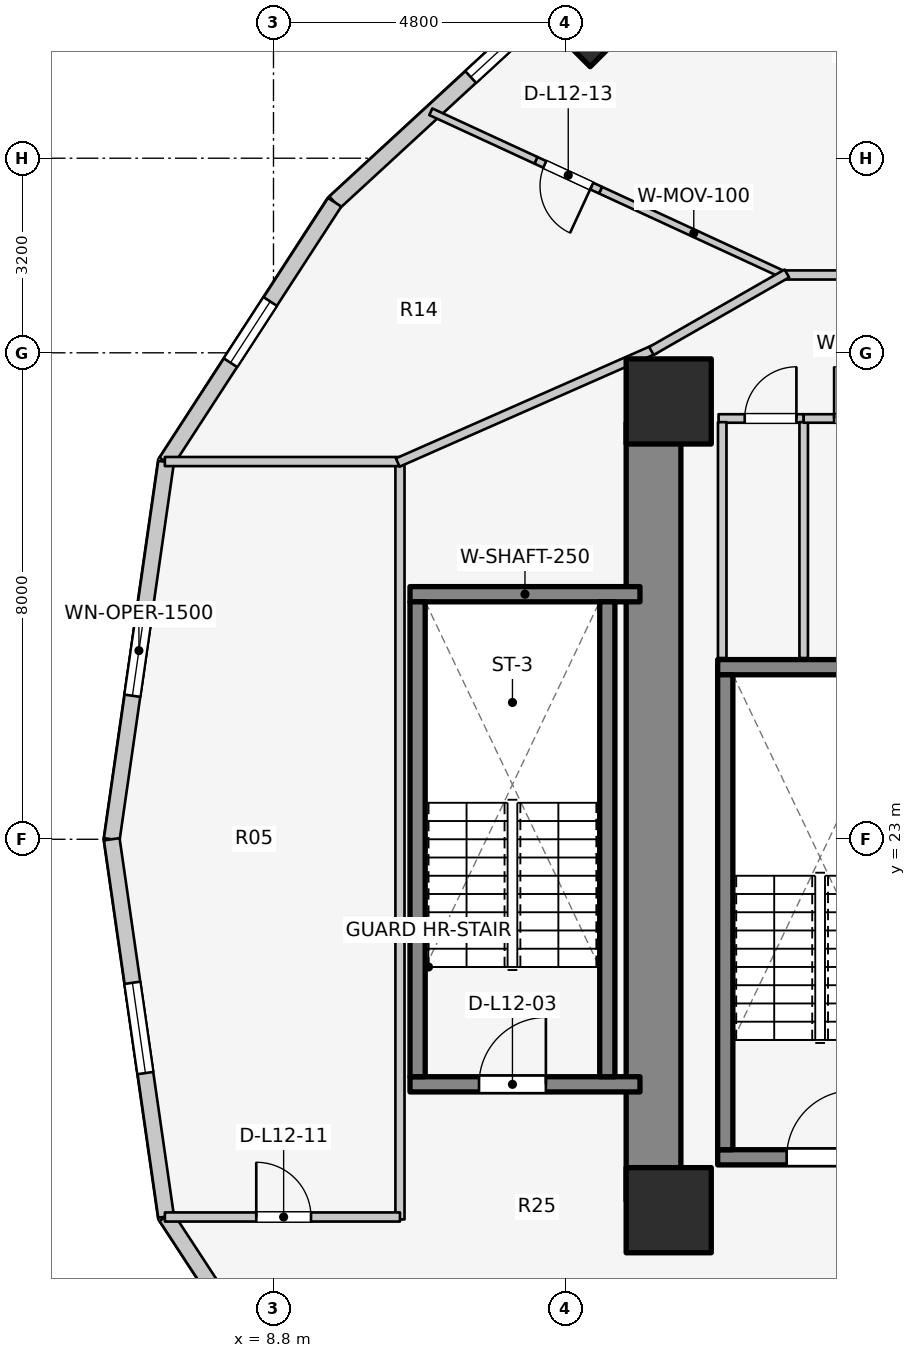
"""IFC4 building model, lengths in metres.
Left out: names, types, materials, properties, quantities, classifications, styles, units other than length and angle.
Written with IfcOpenShell. Run it as: python <this file> out.ifc"""

import sys

from ifc_helpers import new_model, si_unit, direction, frame, frame_2d, origin, origin_2d, place, context, subcontext, project, spatial, rectangle, extrude, element, fill, save


model = new_model("IFC4")
c1 = context("Model", 3, precision=1e-05, world=origin(), true_north=direction((0.0, 1.0)))
c2 = subcontext(c1, "Body", "Model", "MODEL_VIEW")
j1 = project(units=[si_unit("LENGTHUNIT", "METRE"), si_unit("PLANEANGLEUNIT", "RADIAN")], contexts=[c1])
p1 = place(None, origin())
s1 = spatial("IfcSite", under=j1, at=p1, CompositionType="ELEMENT")
p2 = place(p1, origin())
s2 = spatial("IfcBuilding", under=s1, at=p2, CompositionType="ELEMENT")
p3 = place(p2, frame((0.0, 0.0, 43.1)))
s3 = spatial("IfcBuildingStorey", under=s2, at=p3, CompositionType="ELEMENT", Elevation=43.1)
p4 = place(p3, frame((15.05, 17.05, 0.0), z_axis=(0.0, 0.0, 1.0), x_axis=(0.0, 1.0, 0.0)))
e1 = element("IfcWall", 1, at=p4, inside=s3, PredefinedType="SHEAR", context=c2, shape_type="SweptSolid", body=[
    extrude(rectangle(XDim=12.8, YDim=0.9, at=frame_2d((6.4, 0.0))), origin(), (0.0, 0.0, 1.0), 3.1),
])
p5 = place(p3, frame((16.105, 17.77, 0.0), z_axis=(0.0, 0.0, 1.0), x_axis=(1.0, 0.0, 0.0)))
e2 = element("IfcWall", 2, at=p5, inside=s3, PredefinedType="SOLIDWALL", context=c2, shape_type="SweptSolid", body=[
    extrude(rectangle(XDim=3.37, YDim=0.25, at=frame_2d((1.685, 0.0))), origin(), (0.0, 0.0, 1.0), 3.1),
])
p6 = place(p5, frame((1.135, 0.0, 0.0)))
e3 = element("IfcOpeningElement", 3, at=p6, cuts=e2, PredefinedType="OPENING", context=c2, shape_type="SweptSolid", body=[
    extrude(rectangle(XDim=1.1, YDim=2.1, at=frame_2d((0.55, 1.05))), frame((0.0, 0.135, 0.0), z_axis=(0.0, -1.0, 0.0), x_axis=(1.0, 0.0, 0.0)), (0.0, 0.0, 1.0), 0.27),
])
p7 = place(p3, frame((16.105, 25.83, 0.0), z_axis=(0.0, 0.0, 1.0), x_axis=(1.0, 0.0, 0.0)))
e4 = element("IfcWall", 4, at=p7, inside=s3, PredefinedType="SOLIDWALL", context=c2, shape_type="SweptSolid", body=[
    extrude(rectangle(XDim=3.37, YDim=0.25, at=frame_2d((1.685, 0.0))), origin(), (0.0, 0.0, 1.0), 3.1),
])
p8 = place(p3, frame((16.23, 17.895, 0.0), z_axis=(0.0, 0.0, 1.0), x_axis=(0.0, 1.0, 0.0)))
e5 = element("IfcWall", 5, at=p8, inside=s3, PredefinedType="SOLIDWALL", context=c2, shape_type="SweptSolid", body=[
    extrude(rectangle(XDim=7.81, YDim=0.25, at=frame_2d((3.905, 0.0))), origin(), (0.0, 0.0, 1.0), 3.1),
])
p9 = place(p3, frame((11.045, 18.97, 0.0), z_axis=(0.0, 0.0, 1.0), x_axis=(1.0, 0.0, 0.0)))
e6 = element("IfcWall", 6, at=p9, inside=s3, PredefinedType="SOLIDWALL", context=c2, shape_type="SweptSolid", body=[
    extrude(rectangle(XDim=3.782, YDim=0.25, at=frame_2d((1.891, 0.0))), origin(), (0.0, 0.0, 1.0), 3.1),
])
p10 = place(p9, frame((1.135, 0.0, 0.0)))
e7 = element("IfcOpeningElement", 7, at=p10, cuts=e6, PredefinedType="OPENING", context=c2, shape_type="SweptSolid", body=[
    extrude(rectangle(XDim=1.1, YDim=2.1, at=frame_2d((0.55, 1.05))), frame((0.0, 0.135, 0.0), z_axis=(0.0, -1.0, 0.0), x_axis=(1.0, 0.0, 0.0)), (0.0, 0.0, 1.0), 0.27),
])
p11 = place(p3, frame((11.045, 27.03, 0.0), z_axis=(0.0, 0.0, 1.0), x_axis=(1.0, 0.0, 0.0)))
e8 = element("IfcWall", 8, at=p11, inside=s3, PredefinedType="SOLIDWALL", context=c2, shape_type="SweptSolid", body=[
    extrude(rectangle(XDim=3.782, YDim=0.25, at=frame_2d((1.891, 0.0))), origin(), (0.0, 0.0, 1.0), 3.1),
])
for number, where, z_axis, x_axis in (
    (9, (11.17, 19.095, 0.0), (0.0, 0.0, 1.0), (0.0, 1.0, 0.0)),
    (10, (14.29, 19.095, 0.0), (0.0, 0.0, 1.0), (0.0, 1.0, 0.0)),
):
    element("IfcWall", number, at=place(p3, frame(where, z_axis=z_axis, x_axis=x_axis)), inside=s3, PredefinedType="SOLIDWALL", context=c2, shape_type="SweptSolid", body=[
        extrude(rectangle(XDim=7.81, YDim=0.25, at=frame_2d((3.905, 0.0))), origin(), (0.0, 0.0, 1.0), 3.1),
    ])
for number, where, z_axis, x_axis in (
    (11, (15.3, 16.9, 0.0), (0.0, 0.0, 1.0), (1.0, 0.0, 0.0)),
    (12, (15.3, 30.2, 0.0), (0.0, 0.0, 1.0), (1.0, 0.0, 0.0)),
):
    element("IfcColumn", number, at=place(p3, frame(where, z_axis=z_axis, x_axis=x_axis)), inside=s3, PredefinedType="COLUMN", context=c2, shape_type="SweptSolid", body=[
        extrude(rectangle(XDim=1.4, YDim=1.4, at=origin_2d()), origin(), (0.0, 0.0, 1.0), 3.1),
    ])
p12 = place(p3, frame((14.008, 36.554, 0.0), z_axis=(0.0, 0.0, 1.0), x_axis=(-0.707106781187, 0.707106781187, 0.0)))
e13 = element("IfcColumn", 13, at=p12, inside=s3, PredefinedType="COLUMN", context=c2, shape_type="SweptSolid", body=[
    extrude(rectangle(XDim=1.2, YDim=1.2, at=origin_2d()), origin(), (0.0, 0.0, 1.0), 3.1),
])
p13 = place(p3, frame((13.595, 36.965, 0.0), z_axis=(0.0, 0.0, 1.0), x_axis=(-0.735655109293, -0.67735630223, 0.0)))
e14 = element("IfcWall", 14, at=p13, inside=s3, PredefinedType="STANDARD", context=c2, shape_type="SweptSolid", body=[
    extrude(rectangle(XDim=5.151, YDim=0.26, at=frame_2d((2.575, 0.0))), origin(), (0.0, 0.0, 1.0), 1.22),
])
p14 = place(p13, frame((0.91, 0.0, 0.15)))
e15 = element("IfcOpeningElement", 15, at=p14, cuts=e14, PredefinedType="OPENING", context=c2, shape_type="SweptSolid", body=[
    extrude(rectangle(XDim=1.2, YDim=0.9, at=frame_2d((0.6, 0.45))), frame((0.0, 0.14, 0.0), z_axis=(0.0, -1.0, 0.0), x_axis=(1.0, 0.0, 0.0)), (0.0, 0.0, 1.0), 0.28),
])
p15 = place(p3, frame((9.806, 33.476, 0.0), z_axis=(0.0, 0.0, 1.0), x_axis=(-0.544578722263, -0.838709732421, 0.0)))
e16 = element("IfcWall", 16, at=p15, inside=s3, PredefinedType="STANDARD", context=c2, shape_type="SweptSolid", body=[
    extrude(rectangle(XDim=5.092, YDim=0.26, at=frame_2d((2.546, 0.0))), origin(), (0.0, 0.0, 1.0), 1.22),
])
p16 = place(p15, frame((1.946, 0.0, 0.15)))
e17 = element("IfcOpeningElement", 17, at=p16, cuts=e16, PredefinedType="OPENING", context=c2, shape_type="SweptSolid", body=[
    extrude(rectangle(XDim=1.2, YDim=0.9, at=frame_2d((0.6, 0.45))), frame((0.0, 0.14, 0.0), z_axis=(0.0, -1.0, 0.0), x_axis=(1.0, 0.0, 0.0)), (0.0, 0.0, 1.0), 0.28),
])
p17 = place(p3, frame((7.033, 29.205, 0.0), z_axis=(0.0, 0.0, 1.0), x_axis=(-0.142528001686, -0.989790770181, 0.0)))
e18 = element("IfcWall", 18, at=p17, inside=s3, PredefinedType="STANDARD", context=c2, shape_type="SweptSolid", body=[
    extrude(rectangle(XDim=6.269, YDim=0.26, at=frame_2d((3.135, 0.0))), origin(), (0.0, 0.0, 1.0), 2.57),
])
p18 = place(p17, frame((2.385, 0.0, 0.75)))
e19 = element("IfcOpeningElement", 19, at=p18, cuts=e18, PredefinedType="OPENING", context=c2, shape_type="SweptSolid", body=[
    extrude(rectangle(XDim=1.5, YDim=1.6, at=frame_2d((0.75, 0.8))), frame((0.0, 0.14, 0.0), z_axis=(0.0, -1.0, 0.0), x_axis=(1.0, 0.0, 0.0)), (0.0, 0.0, 1.0), 0.28),
])
p19 = place(p3, frame((6.14, 23.0, 0.0), z_axis=(0.0, 0.0, 1.0), x_axis=(0.142528001686, -0.989790770181, 0.0)))
e20 = element("IfcWall", 20, at=p19, inside=s3, PredefinedType="STANDARD", context=c2, shape_type="SweptSolid", body=[
    extrude(rectangle(XDim=6.269, YDim=0.26, at=frame_2d((3.135, 0.0))), origin(), (0.0, 0.0, 1.0), 2.57),
])
p20 = place(p19, frame((2.385, 0.0, 0.75)))
e21 = element("IfcOpeningElement", 21, at=p20, cuts=e20, PredefinedType="OPENING", context=c2, shape_type="SweptSolid", body=[
    extrude(rectangle(XDim=1.5, YDim=1.6, at=frame_2d((0.75, 0.8))), frame((0.0, 0.14, 0.0), z_axis=(0.0, -1.0, 0.0), x_axis=(1.0, 0.0, 0.0)), (0.0, 0.0, 1.0), 0.28),
])
p21 = place(p3, frame((7.033, 16.795, 0.0), z_axis=(0.0, 0.0, 1.0), x_axis=(0.547702757047, -0.836672988642, 0.0)))
e22 = element("IfcWall", 22, at=p21, inside=s3, PredefinedType="STANDARD", context=c2, shape_type="SweptSolid", body=[
    extrude(rectangle(XDim=5.062, YDim=0.26, at=frame_2d((2.531, 0.0))), origin(), (0.0, 0.0, 1.0), 1.22),
])
p22 = place(p21, frame((1.931, 0.0, 0.15)))
e23 = element("IfcOpeningElement", 23, at=p22, cuts=e22, PredefinedType="OPENING", context=c2, shape_type="SweptSolid", body=[
    extrude(rectangle(XDim=1.2, YDim=0.9, at=frame_2d((0.6, 0.45))), frame((0.0, 0.14, 0.0), z_axis=(0.0, -1.0, 0.0), x_axis=(1.0, 0.0, 0.0)), (0.0, 0.0, 1.0), 0.28),
])
p23 = place(p3, frame((16.12, 29.92, 0.0), z_axis=(0.0, 0.0, 1.0), x_axis=(1.0, 0.0, 0.0)))
e24 = element("IfcWall", 24, at=p23, inside=s3, PredefinedType="PLUMBINGWALL", context=c2, shape_type="SweptSolid", body=[
    extrude(rectangle(XDim=1.4, YDim=0.14, at=frame_2d((0.7, 0.0))), origin(), (0.0, 0.0, 1.0), 2.575),
])
p24 = place(p23, frame((0.43, 0.0, 0.0)))
e25 = element("IfcOpeningElement", 25, at=p24, cuts=e24, PredefinedType="OPENING", context=c2, shape_type="SweptSolid", body=[
    extrude(rectangle(XDim=0.85, YDim=2.05, at=frame_2d((0.425, 1.025))), frame((0.0, 0.08, 0.0), z_axis=(0.0, -1.0, 0.0), x_axis=(1.0, 0.0, 0.0)), (0.0, 0.0, 1.0), 0.16),
])
for number, where, z_axis, x_axis in (
    (26, (16.18, 25.98, 0.0), (0.0, 0.0, 1.0), (0.0, 1.0, 0.0)),
    (27, (17.52, 25.98, 0.0), (0.0, 0.0, 1.0), (0.0, 1.0, 0.0)),
):
    element("IfcWall", number, at=place(p3, frame(where, z_axis=z_axis, x_axis=x_axis)), inside=s3, PredefinedType="PLUMBINGWALL", context=c2, shape_type="SweptSolid", body=[
        extrude(rectangle(XDim=3.88, YDim=0.14, at=frame_2d((1.94, 0.0))), origin(), (0.0, 0.0, 1.0), 2.575),
    ])
p25 = place(p3, frame((17.52, 29.92, 0.0), z_axis=(0.0, 0.0, 1.0), x_axis=(1.0, 0.0, 0.0)))
e28 = element("IfcWall", 28, at=p25, inside=s3, PredefinedType="PLUMBINGWALL", context=c2, shape_type="SweptSolid", body=[
    extrude(rectangle(XDim=1.9, YDim=0.14, at=frame_2d((0.95, 0.0))), origin(), (0.0, 0.0, 1.0), 2.575),
])
p26 = place(p25, frame((0.5, 0.0, 0.0)))
e29 = element("IfcOpeningElement", 29, at=p26, cuts=e28, PredefinedType="OPENING", context=c2, shape_type="SweptSolid", body=[
    extrude(rectangle(XDim=0.85, YDim=2.05, at=frame_2d((0.425, 1.025))), frame((0.0, 0.08, 0.0), z_axis=(0.0, -1.0, 0.0), x_axis=(1.0, 0.0, 0.0)), (0.0, 0.0, 1.0), 0.16),
])
p27 = place(p3, frame((10.88, 16.748, 0.0), z_axis=(0.0, 0.0, 1.0), x_axis=(0.0, 1.0, 0.0)))
e30 = element("IfcWall", 30, at=p27, inside=s3, PredefinedType="PARTITIONING", context=c2, shape_type="SweptSolid", body=[
    extrude(rectangle(XDim=12.503, YDim=0.15, at=frame_2d((6.252, 0.0))), origin(), (0.0, 0.0, 1.0), 2.12),
])
p28 = place(p3, frame((7.014, 16.788, 0.0), z_axis=(0.0, 0.0, 1.0), x_axis=(1.0, 0.0, 0.0)))
e31 = element("IfcWall", 31, at=p28, inside=s3, PredefinedType="PARTITIONING", context=c2, shape_type="SweptSolid", body=[
    extrude(rectangle(XDim=3.866, YDim=0.15, at=frame_2d((1.933, 0.0))), origin(), (0.0, 0.0, 1.0), 2.575),
])
p29 = place(p28, frame((1.503, 0.0, 0.0)))
e32 = element("IfcOpeningElement", 32, at=p29, cuts=e31, PredefinedType="OPENING", context=c2, shape_type="SweptSolid", body=[
    extrude(rectangle(XDim=0.9, YDim=2.1, at=frame_2d((0.45, 1.05))), frame((0.0, 0.085, 0.0), z_axis=(0.0, -1.0, 0.0), x_axis=(1.0, 0.0, 0.0)), (0.0, 0.0, 1.0), 0.17),
])
p30 = place(p3, frame((7.014, 29.212, 0.0), z_axis=(0.0, 0.0, 1.0), x_axis=(1.0, 0.0, 0.0)))
e33 = element("IfcWall", 33, at=p30, inside=s3, PredefinedType="PARTITIONING", context=c2, shape_type="SweptSolid", body=[
    extrude(rectangle(XDim=3.866, YDim=0.15, at=frame_2d((1.933, 0.0))), origin(), (0.0, 0.0, 1.0), 2.575),
])
p31 = place(p3, frame((10.844, 29.196, 0.0), z_axis=(0.0, 0.0, 1.0), x_axis=(0.91502756289, 0.403391322604, 0.0)))
e34 = element("IfcWall", 34, at=p31, inside=s3, PredefinedType="PARTITIONING", context=c2, shape_type="SweptSolid", body=[
    extrude(rectangle(XDim=4.637, YDim=0.15, at=frame_2d((2.319, 0.0))), origin(), (0.0, 0.0, 1.0), 1.22),
])
p32 = place(p3, frame((17.245, 32.259, 0.0), z_axis=(0.0, 0.0, 1.0), x_axis=(-0.907887445426, 0.419214010307, 0.0)))
e35 = element("IfcWall", 35, at=p32, inside=s3, PredefinedType="MOVABLE", context=c2, shape_type="SweptSolid", body=[
    extrude(rectangle(XDim=3.378, YDim=0.12, at=frame_2d((1.689, 0.0))), origin(), (0.0, 0.0, 1.0), 1.22),
])
p33 = place(p3, frame((14.179, 33.675, 0.0), z_axis=(0.0, 0.0, 1.0), x_axis=(-0.907812768844, 0.419375698776, 0.0)))
e36 = element("IfcWall", 36, at=p33, inside=s3, PredefinedType="MOVABLE", context=c2, shape_type="SweptSolid", body=[
    extrude(rectangle(XDim=1.17, YDim=0.12, at=frame_2d((0.585, 0.0))), origin(), (0.0, 0.0, 1.0), 2.11),
])
p34 = place(p33, frame((0.16, 0.0, 0.0)))
e37 = element("IfcOpeningElement", 37, at=p34, cuts=e36, PredefinedType="OPENING", context=c2, shape_type="SweptSolid", body=[
    extrude(rectangle(XDim=0.85, YDim=2.05, at=frame_2d((0.425, 1.025))), frame((0.0, 0.07, 0.0), z_axis=(0.0, -1.0, 0.0), x_axis=(1.0, 0.0, 0.0)), (0.0, 0.0, 1.0), 0.14),
])
p35 = place(p3, frame((13.116, 34.166, 0.0), z_axis=(0.0, 0.0, 1.0), x_axis=(-0.907914359179, 0.419155718554, 0.0)))
e38 = element("IfcWall", 38, at=p35, inside=s3, PredefinedType="MOVABLE", context=c2, shape_type="SweptSolid", body=[
    extrude(rectangle(XDim=1.905, YDim=0.12, at=frame_2d((0.952, 0.0))), origin(), (0.0, 0.0, 1.0), 2.575),
])
p36 = place(p3, frame((17.15, 32.28, 0.0), z_axis=(0.0, 0.0, 1.0), x_axis=(1.0, 0.0, 0.0)))
e39 = element("IfcWall", 39, at=p36, inside=s3, PredefinedType="PARTITIONING", context=c2, shape_type="SweptSolid", body=[
    extrude(rectangle(XDim=1.14, YDim=0.15, at=frame_2d((0.57, 0.0))), origin(), (0.0, 0.0, 1.0), 2.575),
])
p37 = place(p3, frame((17.243, 32.305, 0.0), z_axis=(0.0, 0.0, 1.0), x_axis=(-0.867991349648, -0.496579315857, 0.0)))
e40 = element("IfcWall", 40, at=p37, inside=s3, PredefinedType="PARTITIONING", context=c2, shape_type="SweptSolid", body=[
    extrude(rectangle(XDim=2.567, YDim=0.15, at=frame_2d((1.283, 0.0))), origin(), (0.0, 0.0, 1.0), 1.22),
])
p38 = place(p14, origin())
e41 = element("IfcWindow", 41, at=p38, inside=s3, PartitioningType="SINGLE_PANEL", PredefinedType="WINDOW", context=c2, shape_type="SweptSolid", body=[
    extrude(rectangle(XDim=1.2, YDim=0.9, at=frame_2d((0.6, 0.45))), frame((0.0, 0.03, 0.0), z_axis=(0.0, -1.0, 0.0), x_axis=(1.0, 0.0, 0.0)), (0.0, 0.0, 1.0), 0.06),
])
fill(e15, e41)
p39 = place(p16, origin())
e42 = element("IfcWindow", 42, at=p39, inside=s3, PartitioningType="SINGLE_PANEL", PredefinedType="WINDOW", context=c2, shape_type="SweptSolid", body=[
    extrude(rectangle(XDim=1.2, YDim=0.9, at=frame_2d((0.6, 0.45))), frame((0.0, 0.03, 0.0), z_axis=(0.0, -1.0, 0.0), x_axis=(1.0, 0.0, 0.0)), (0.0, 0.0, 1.0), 0.06),
])
fill(e17, e42)
p40 = place(p18, origin())
e43 = element("IfcWindow", 43, at=p40, inside=s3, PartitioningType="SINGLE_PANEL", PredefinedType="WINDOW", context=c2, shape_type="SweptSolid", body=[
    extrude(rectangle(XDim=1.5, YDim=1.6, at=frame_2d((0.75, 0.8))), frame((0.0, 0.03, 0.0), z_axis=(0.0, -1.0, 0.0), x_axis=(1.0, 0.0, 0.0)), (0.0, 0.0, 1.0), 0.06),
])
fill(e19, e43)
p41 = place(p20, origin())
e44 = element("IfcWindow", 44, at=p41, inside=s3, PartitioningType="SINGLE_PANEL", PredefinedType="WINDOW", context=c2, shape_type="SweptSolid", body=[
    extrude(rectangle(XDim=1.5, YDim=1.6, at=frame_2d((0.75, 0.8))), frame((0.0, 0.03, 0.0), z_axis=(0.0, -1.0, 0.0), x_axis=(1.0, 0.0, 0.0)), (0.0, 0.0, 1.0), 0.06),
])
fill(e21, e44)
p42 = place(p6, origin())
e45 = element("IfcDoor", 45, at=p42, inside=s3, OperationType="SINGLE_SWING_RIGHT", PredefinedType="DOOR", context=c2, shape_type="SweptSolid", body=[
    extrude(rectangle(XDim=1.1, YDim=2.1, at=frame_2d((0.55, 1.05))), frame((0.0, 0.025, 0.0), z_axis=(0.0, -1.0, 0.0), x_axis=(1.0, 0.0, 0.0)), (0.0, 0.0, 1.0), 0.05),
])
fill(e3, e45)
p43 = place(p10, origin())
e46 = element("IfcDoor", 46, at=p43, inside=s3, OperationType="SINGLE_SWING_RIGHT", PredefinedType="DOOR", context=c2, shape_type="SweptSolid", body=[
    extrude(rectangle(XDim=1.1, YDim=2.1, at=frame_2d((0.55, 1.05))), frame((0.0, 0.025, 0.0), z_axis=(0.0, -1.0, 0.0), x_axis=(1.0, 0.0, 0.0)), (0.0, 0.0, 1.0), 0.05),
])
fill(e7, e46)
p44 = place(p24, origin())
e47 = element("IfcDoor", 47, at=p44, inside=s3, OperationType="SINGLE_SWING_RIGHT", PredefinedType="DOOR", context=c2, shape_type="SweptSolid", body=[
    extrude(rectangle(XDim=0.85, YDim=2.05, at=frame_2d((0.425, 1.025))), frame((0.0, 0.025, 0.0), z_axis=(0.0, -1.0, 0.0), x_axis=(1.0, 0.0, 0.0)), (0.0, 0.0, 1.0), 0.05),
])
fill(e25, e47)
p45 = place(p26, origin())
e48 = element("IfcDoor", 48, at=p45, inside=s3, OperationType="SINGLE_SWING_LEFT", PredefinedType="DOOR", context=c2, shape_type="SweptSolid", body=[
    extrude(rectangle(XDim=0.85, YDim=2.05, at=frame_2d((0.425, 1.025))), frame((0.0, 0.025, 0.0), z_axis=(0.0, -1.0, 0.0), x_axis=(1.0, 0.0, 0.0)), (0.0, 0.0, 1.0), 0.05),
])
fill(e29, e48)
p46 = place(p29, origin())
e49 = element("IfcDoor", 49, at=p46, inside=s3, OperationType="SINGLE_SWING_LEFT", PredefinedType="DOOR", context=c2, shape_type="SweptSolid", body=[
    extrude(rectangle(XDim=0.9, YDim=2.1, at=frame_2d((0.45, 1.05))), frame((0.0, 0.025, 0.0), z_axis=(0.0, -1.0, 0.0), x_axis=(1.0, 0.0, 0.0)), (0.0, 0.0, 1.0), 0.05),
])
fill(e32, e49)
p47 = place(p34, origin())
e50 = element("IfcDoor", 50, at=p47, inside=s3, OperationType="SINGLE_SWING_LEFT", PredefinedType="DOOR", context=c2, shape_type="SweptSolid", body=[
    extrude(rectangle(XDim=0.85, YDim=2.05, at=frame_2d((0.425, 1.025))), frame((0.0, 0.025, 0.0), z_axis=(0.0, -1.0, 0.0), x_axis=(1.0, 0.0, 0.0)), (0.0, 0.0, 1.0), 0.05),
])
fill(e37, e50)
save(model, sys.argv[1])
